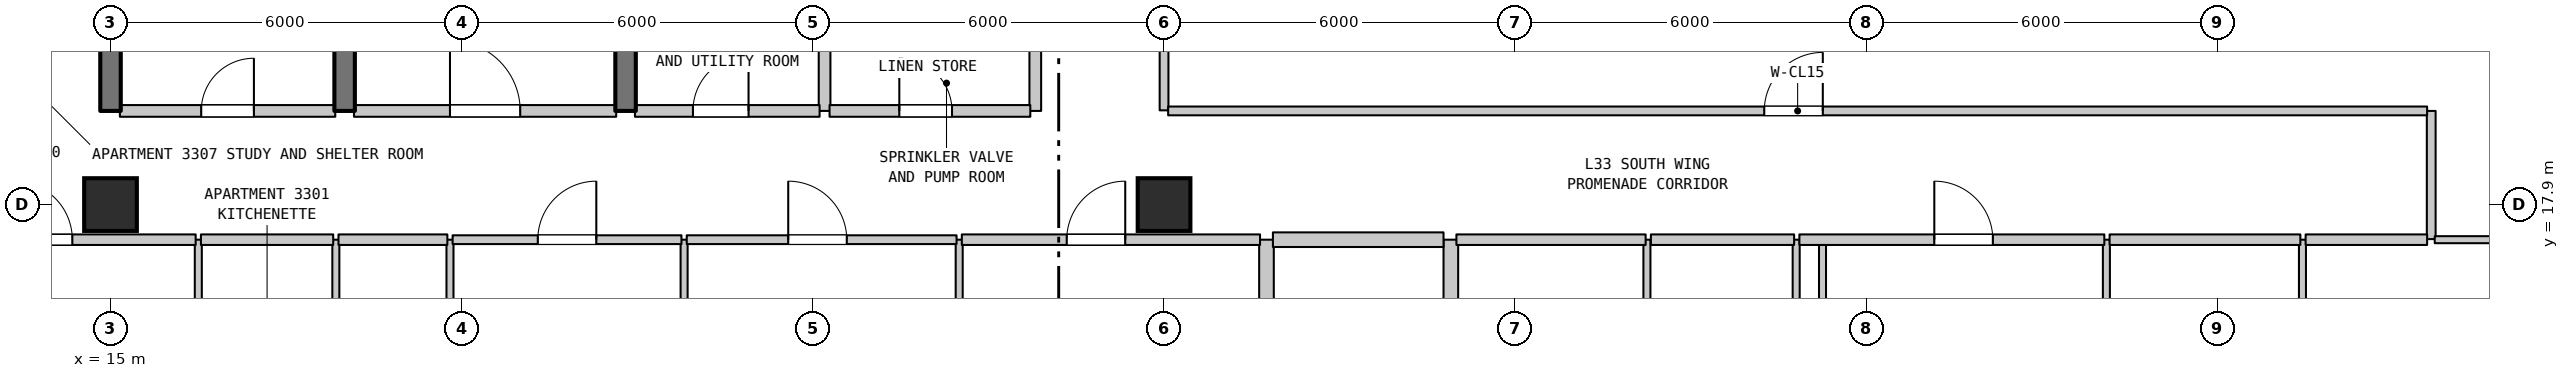
"""IFC4 building model, lengths in metres.
Left out: names, types, materials, properties, quantities, classifications, styles, units other than length and angle.
Written with IfcOpenShell. Run it as: python <this file> out.ifc"""

import sys

from ifc_helpers import new_model, si_unit, direction, frame, frame_2d, origin, origin_2d, place, context, subcontext, project, spatial, rectangle, extrude, element, fill, save


model = new_model("IFC4")
c1 = context("Model", 3, precision=1e-05, world=origin(), true_north=direction((0.0, 1.0)))
c2 = subcontext(c1, "Body", "Model", "MODEL_VIEW")
j1 = project(units=[si_unit("LENGTHUNIT", "METRE"), si_unit("PLANEANGLEUNIT", "RADIAN")], contexts=[c1])
p1 = place(None, origin())
s1 = spatial("IfcSite", under=j1, at=p1, CompositionType="ELEMENT")
p2 = place(p1, origin())
s2 = spatial("IfcBuilding", under=s1, at=p2, CompositionType="ELEMENT")
p3 = place(p2, frame((0.0, 0.0, 137.2)))
s3 = spatial("IfcBuildingStorey", under=s2, at=p3, CompositionType="ELEMENT", Elevation=137.2)
for number, where, z_axis, x_axis in (
    (1, (15.0, 17.9, 0.0), (0.0, 0.0, 1.0), (1.0, 0.0, 0.0)),
    (2, (33.0, 17.9, 0.0), (0.0, 0.0, 1.0), (1.0, 0.0, 0.0)),
):
    element("IfcColumn", number, at=place(p3, frame(where, z_axis=z_axis, x_axis=x_axis)), inside=s3, PredefinedType="COLUMN", context=c2, shape_type="SweptSolid", body=[
        extrude(rectangle(XDim=0.9, YDim=0.9, at=origin_2d()), origin(), (0.0, 0.0, 1.0), 3.7),
    ])
p4 = place(p3, frame((15.0, 19.5, 0.0), z_axis=(0.0, 0.0, 1.0), x_axis=(0.0, 1.0, 0.0)))
e3 = element("IfcWall", 3, at=p4, inside=s3, PredefinedType="SHEAR", context=c2, shape_type="SweptSolid", body=[
    extrude(rectangle(XDim=3.2, YDim=0.35, at=frame_2d((1.6, 0.0))), origin(), (0.0, 0.0, 1.0), 3.385),
])
p5 = place(p3, frame((16.5, 14.1, 0.0), z_axis=(0.0, 0.0, 1.0), x_axis=(0.0, 1.0, 0.0)))
e4 = element("IfcWall", 4, at=p5, inside=s3, PredefinedType="PARTITIONING", context=c2, shape_type="SweptSolid", body=[
    extrude(rectangle(XDim=3.2, YDim=0.12, at=frame_2d((1.6, 0.0))), origin(), (0.0, 0.0, 1.0), 3.385),
])
p6 = place(p5, frame((1.15, 0.0, 0.0)))
e5 = element("IfcOpeningElement", 5, at=p6, cuts=e4, PredefinedType="OPENING", context=c2, shape_type="SweptSolid", body=[
    extrude(rectangle(XDim=0.9, YDim=2.15, at=frame_2d((0.45, 1.075))), frame((0.0, 0.07, 0.0), z_axis=(0.0, -1.0, 0.0), x_axis=(1.0, 0.0, 0.0)), (0.0, 0.0, 1.0), 0.14),
])
p7 = place(p3, frame((18.85, 14.1, 0.0), z_axis=(0.0, 0.0, 1.0), x_axis=(0.0, 1.0, 0.0)))
e6 = element("IfcWall", 6, at=p7, inside=s3, PredefinedType="PARTITIONING", context=c2, shape_type="SweptSolid", body=[
    extrude(rectangle(XDim=3.2, YDim=0.12, at=frame_2d((1.6, 0.0))), origin(), (0.0, 0.0, 1.0), 3.385),
])
p8 = place(p3, frame((19.0, 19.5, 0.0), z_axis=(0.0, 0.0, 1.0), x_axis=(0.0, 1.0, 0.0)))
e7 = element("IfcWall", 7, at=p8, inside=s3, PredefinedType="SHEAR", context=c2, shape_type="SweptSolid", body=[
    extrude(rectangle(XDim=3.2, YDim=0.35, at=frame_2d((1.6, 0.0))), origin(), (0.0, 0.0, 1.0), 3.385),
])
p9 = place(p3, frame((20.8, 6.888, 0.0), z_axis=(0.0, 0.0, 1.0), x_axis=(0.0, 1.0, 0.0)))
e8 = element("IfcWall", 8, at=p9, inside=s3, PredefinedType="PARTITIONING", context=c2, shape_type="SweptSolid", body=[
    extrude(rectangle(XDim=10.412, YDim=0.12, at=frame_2d((5.206, 0.0))), origin(), (0.0, 0.0, 1.0), 3.385),
])
p10 = place(p3, frame((23.8, 19.5, 0.0), z_axis=(0.0, 0.0, 1.0), x_axis=(0.0, 1.0, 0.0)))
e9 = element("IfcWall", 9, at=p10, inside=s3, PredefinedType="SHEAR", context=c2, shape_type="SweptSolid", body=[
    extrude(rectangle(XDim=3.2, YDim=0.35, at=frame_2d((1.6, 0.0))), origin(), (0.0, 0.0, 1.0), 3.385),
])
p11 = place(p3, frame((24.8, 0.71, 0.0), z_axis=(0.0, 0.0, 1.0), x_axis=(0.0, 1.0, 0.0)))
e10 = element("IfcWall", 10, at=p11, inside=s3, PredefinedType="PARTITIONING", context=c2, shape_type="SweptSolid", body=[
    extrude(rectangle(XDim=16.59, YDim=0.12, at=frame_2d((8.295, 0.0))), origin(), (0.0, 0.0, 1.0), 3.385),
])
p12 = place(p3, frame((27.2, 19.5, 0.0), z_axis=(0.0, 0.0, 1.0), x_axis=(0.0, 1.0, 0.0)))
e11 = element("IfcWall", 11, at=p12, inside=s3, PredefinedType="STANDARD", context=c2, shape_type="SweptSolid", body=[
    extrude(rectangle(XDim=1.6, YDim=0.2, at=frame_2d((0.8, 0.0))), origin(), (0.0, 0.0, 1.0), 3.385),
])
p13 = place(p3, frame((29.5, 14.85, 0.0), z_axis=(0.0, 0.0, 1.0), x_axis=(0.0, 1.0, 0.0)))
e12 = element("IfcWall", 12, at=p13, inside=s3, PredefinedType="PARTITIONING", context=c2, shape_type="SweptSolid", body=[
    extrude(rectangle(XDim=2.45, YDim=0.12, at=frame_2d((1.225, 0.0))), origin(), (0.0, 0.0, 1.0), 3.385),
])
p14 = place(p3, frame((30.8, 19.5, 0.0), z_axis=(0.0, 0.0, 1.0), x_axis=(0.0, 1.0, 0.0)))
e13 = element("IfcWall", 13, at=p14, inside=s3, PredefinedType="STANDARD", context=c2, shape_type="SweptSolid", body=[
    extrude(rectangle(XDim=1.6, YDim=0.2, at=frame_2d((0.8, 0.0))), origin(), (0.0, 0.0, 1.0), 3.385),
])
p15 = place(p3, frame((33.0, 19.51, 0.0), z_axis=(0.0, 0.0, 1.0), x_axis=(0.0, 1.0, 0.0)))
e14 = element("IfcWall", 14, at=p15, inside=s3, PredefinedType="STANDARD", context=c2, shape_type="SweptSolid", body=[
    extrude(rectangle(XDim=3.66, YDim=0.15, at=frame_2d((1.83, 0.0))), origin(), (0.0, 0.0, 1.0), 2.935),
])
p16 = place(p15, frame((1.258, 0.0, 0.0)))
e15 = element("IfcOpeningElement", 15, at=p16, cuts=e14, PredefinedType="OPENING", context=c2, shape_type="SweptSolid", body=[
    extrude(rectangle(XDim=1.0, YDim=2.15, at=frame_2d((0.5, 1.075))), frame((0.0, 0.085, 0.0), z_axis=(0.0, -1.0, 0.0), x_axis=(1.0, 0.0, 0.0)), (0.0, 0.0, 1.0), 0.17),
])
for number, where, z_axis, x_axis in (
    (16, (34.75, 11.15, 0.0), (0.0, 0.0, 1.0), (0.0, 1.0, 0.0)),
    (17, (37.9, 11.15, 0.0), (0.0, 0.0, 1.0), (0.0, 1.0, 0.0)),
):
    element("IfcWall", number, at=place(p3, frame(where, z_axis=z_axis, x_axis=x_axis)), inside=s3, PredefinedType="STANDARD", context=c2, shape_type="SweptSolid", body=[
        extrude(rectangle(XDim=6.15, YDim=0.25, at=frame_2d((3.075, 0.0))), origin(), (0.0, 0.0, 1.0), 3.385),
    ])
for number, where, z_axis, x_axis in (
    (18, (41.25, 11.15, 0.0), (0.0, 0.0, 1.0), (0.0, 1.0, 0.0)),
    (19, (43.8, 11.15, 0.0), (0.0, 0.0, 1.0), (0.0, 1.0, 0.0)),
):
    element("IfcWall", number, at=place(p3, frame(where, z_axis=z_axis, x_axis=x_axis)), inside=s3, PredefinedType="PARTITIONING", context=c2, shape_type="SweptSolid", body=[
        extrude(rectangle(XDim=6.15, YDim=0.12, at=frame_2d((3.075, 0.0))), origin(), (0.0, 0.0, 1.0), 3.385),
    ])
p17 = place(p3, frame((44.25, 14.85, 0.0), z_axis=(0.0, 0.0, 1.0), x_axis=(0.0, 1.0, 0.0)))
e20 = element("IfcWall", 20, at=p17, inside=s3, PredefinedType="PARTITIONING", context=c2, shape_type="SweptSolid", body=[
    extrude(rectangle(XDim=2.45, YDim=0.12, at=frame_2d((1.225, 0.0))), origin(), (0.0, 0.0, 1.0), 3.385),
])
for number, where, z_axis, x_axis in (
    (21, (49.1, 11.15, 0.0), (0.0, 0.0, 1.0), (0.0, 1.0, 0.0)),
    (22, (52.45, 11.15, 0.0), (0.0, 0.0, 1.0), (0.0, 1.0, 0.0)),
):
    element("IfcWall", number, at=place(p3, frame(where, z_axis=z_axis, x_axis=x_axis)), inside=s3, PredefinedType="PARTITIONING", context=c2, shape_type="SweptSolid", body=[
        extrude(rectangle(XDim=6.15, YDim=0.12, at=frame_2d((3.075, 0.0))), origin(), (0.0, 0.0, 1.0), 3.385),
    ])
p18 = place(p3, frame((54.65, 17.31, 0.0), z_axis=(0.0, 0.0, 1.0), x_axis=(0.0, 1.0, 0.0)))
e23 = element("IfcWall", 23, at=p18, inside=s3, PredefinedType="STANDARD", context=c2, shape_type="SweptSolid", body=[
    extrude(rectangle(XDim=2.19, YDim=0.15, at=frame_2d((1.095, 0.0))), origin(), (0.0, 0.0, 1.0), 3.385),
])
p19 = place(p3, frame((12.875, 17.3, 0.0), z_axis=(0.0, 0.0, 1.0), x_axis=(1.0, 0.0, 0.0)))
e24 = element("IfcWall", 24, at=p19, inside=s3, PredefinedType="STANDARD", context=c2, shape_type="SweptSolid", body=[
    extrude(rectangle(XDim=3.58, YDim=0.18, at=frame_2d((1.79, 0.0))), origin(), (0.0, 0.0, 1.0), 3.385),
])
p20 = place(p19, frame((0.473, 0.0, 0.0)))
e25 = element("IfcOpeningElement", 25, at=p20, cuts=e24, PredefinedType="OPENING", context=c2, shape_type="SweptSolid", body=[
    extrude(rectangle(XDim=1.0, YDim=2.15, at=frame_2d((0.5, 1.075))), frame((0.0, 0.1, 0.0), z_axis=(0.0, -1.0, 0.0), x_axis=(1.0, 0.0, 0.0)), (0.0, 0.0, 1.0), 0.2),
])
p21 = place(p3, frame((16.545, 17.3, 0.0), z_axis=(0.0, 0.0, 1.0), x_axis=(1.0, 0.0, 0.0)))
e26 = element("IfcWall", 26, at=p21, inside=s3, PredefinedType="STANDARD", context=c2, shape_type="SweptSolid", body=[
    extrude(rectangle(XDim=2.26, YDim=0.18, at=frame_2d((1.13, 0.0))), origin(), (0.0, 0.0, 1.0), 3.385),
])
p22 = place(p3, frame((18.895, 17.3, 0.0), z_axis=(0.0, 0.0, 1.0), x_axis=(1.0, 0.0, 0.0)))
e27 = element("IfcWall", 27, at=p22, inside=s3, PredefinedType="STANDARD", context=c2, shape_type="SweptSolid", body=[
    extrude(rectangle(XDim=1.86, YDim=0.18, at=frame_2d((0.93, 0.0))), origin(), (0.0, 0.0, 1.0), 3.385),
])
p23 = place(p3, frame((20.845, 17.3, 0.0), z_axis=(0.0, 0.0, 1.0), x_axis=(1.0, 0.0, 0.0)))
e28 = element("IfcWall", 28, at=p23, inside=s3, PredefinedType="STANDARD", context=c2, shape_type="SweptSolid", body=[
    extrude(rectangle(XDim=3.91, YDim=0.15, at=frame_2d((1.955, 0.0))), origin(), (0.0, 0.0, 1.0), 3.385),
])
p24 = place(p23, frame((1.455, 0.0, 0.0)))
e29 = element("IfcOpeningElement", 29, at=p24, cuts=e28, PredefinedType="OPENING", context=c2, shape_type="SweptSolid", body=[
    extrude(rectangle(XDim=1.0, YDim=2.15, at=frame_2d((0.5, 1.075))), frame((0.0, 0.085, 0.0), z_axis=(0.0, -1.0, 0.0), x_axis=(1.0, 0.0, 0.0)), (0.0, 0.0, 1.0), 0.17),
])
p25 = place(p3, frame((24.845, 17.3, 0.0), z_axis=(0.0, 0.0, 1.0), x_axis=(1.0, 0.0, 0.0)))
e30 = element("IfcWall", 30, at=p25, inside=s3, PredefinedType="STANDARD", context=c2, shape_type="SweptSolid", body=[
    extrude(rectangle(XDim=4.61, YDim=0.15, at=frame_2d((2.305, 0.0))), origin(), (0.0, 0.0, 1.0), 3.385),
])
p26 = place(p25, frame((1.734, 0.0, 0.0)))
e31 = element("IfcOpeningElement", 31, at=p26, cuts=e30, PredefinedType="OPENING", context=c2, shape_type="SweptSolid", body=[
    extrude(rectangle(XDim=1.0, YDim=2.15, at=frame_2d((0.5, 1.075))), frame((0.0, 0.085, 0.0), z_axis=(0.0, -1.0, 0.0), x_axis=(1.0, 0.0, 0.0)), (0.0, 0.0, 1.0), 0.17),
])
p27 = place(p3, frame((29.545, 17.3, 0.0), z_axis=(0.0, 0.0, 1.0), x_axis=(1.0, 0.0, 0.0)))
e32 = element("IfcWall", 32, at=p27, inside=s3, PredefinedType="STANDARD", context=c2, shape_type="SweptSolid", body=[
    extrude(rectangle(XDim=5.095, YDim=0.18, at=frame_2d((2.547, 0.0))), origin(), (0.0, 0.0, 1.0), 3.385),
])
p28 = place(p27, frame((1.792, 0.0, 0.0)))
e33 = element("IfcOpeningElement", 33, at=p28, cuts=e32, PredefinedType="OPENING", context=c2, shape_type="SweptSolid", body=[
    extrude(rectangle(XDim=1.0, YDim=2.15, at=frame_2d((0.5, 1.075))), frame((0.0, 0.1, 0.0), z_axis=(0.0, -1.0, 0.0), x_axis=(1.0, 0.0, 0.0)), (0.0, 0.0, 1.0), 0.2),
])
p29 = place(p3, frame((34.86, 17.3, 0.0), z_axis=(0.0, 0.0, 1.0), x_axis=(1.0, 0.0, 0.0)))
e34 = element("IfcWall", 34, at=p29, inside=s3, PredefinedType="STANDARD", context=c2, shape_type="SweptSolid", body=[
    extrude(rectangle(XDim=2.915, YDim=0.25, at=frame_2d((1.458, 0.0))), origin(), (0.0, 0.0, 1.0), 3.385),
])
p30 = place(p3, frame((37.995, 17.3, 0.0), z_axis=(0.0, 0.0, 1.0), x_axis=(1.0, 0.0, 0.0)))
e35 = element("IfcWall", 35, at=p30, inside=s3, PredefinedType="STANDARD", context=c2, shape_type="SweptSolid", body=[
    extrude(rectangle(XDim=3.233, YDim=0.18, at=frame_2d((1.616, 0.0))), origin(), (0.0, 0.0, 1.0), 3.385),
])
p31 = place(p3, frame((41.318, 17.3, 0.0), z_axis=(0.0, 0.0, 1.0), x_axis=(1.0, 0.0, 0.0)))
e36 = element("IfcWall", 36, at=p31, inside=s3, PredefinedType="STANDARD", context=c2, shape_type="SweptSolid", body=[
    extrude(rectangle(XDim=2.447, YDim=0.18, at=frame_2d((1.223, 0.0))), origin(), (0.0, 0.0, 1.0), 3.385),
])
p32 = place(p3, frame((43.855, 17.3, 0.0), z_axis=(0.0, 0.0, 1.0), x_axis=(1.0, 0.0, 0.0)))
e37 = element("IfcWall", 37, at=p32, inside=s3, PredefinedType="STANDARD", context=c2, shape_type="SweptSolid", body=[
    extrude(rectangle(XDim=5.21, YDim=0.18, at=frame_2d((2.605, 0.0))), origin(), (0.0, 0.0, 1.0), 3.385),
])
p33 = place(p32, frame((2.305, 0.0, 0.0)))
e38 = element("IfcOpeningElement", 38, at=p33, cuts=e37, PredefinedType="OPENING", context=c2, shape_type="SweptSolid", body=[
    extrude(rectangle(XDim=1.0, YDim=2.15, at=frame_2d((0.5, 1.075))), frame((0.0, 0.1, 0.0), z_axis=(0.0, -1.0, 0.0), x_axis=(1.0, 0.0, 0.0)), (0.0, 0.0, 1.0), 0.2),
])
p34 = place(p3, frame((49.155, 17.3, 0.0), z_axis=(0.0, 0.0, 1.0), x_axis=(1.0, 0.0, 0.0)))
e39 = element("IfcWall", 39, at=p34, inside=s3, PredefinedType="STANDARD", context=c2, shape_type="SweptSolid", body=[
    extrude(rectangle(XDim=3.259, YDim=0.18, at=frame_2d((1.629, 0.0))), origin(), (0.0, 0.0, 1.0), 3.385),
])
p35 = place(p3, frame((52.504, 17.3, 0.0), z_axis=(0.0, 0.0, 1.0), x_axis=(1.0, 0.0, 0.0)))
e40 = element("IfcWall", 40, at=p35, inside=s3, PredefinedType="STANDARD", context=c2, shape_type="SweptSolid", body=[
    extrude(rectangle(XDim=2.076, YDim=0.18, at=frame_2d((1.038, 0.0))), origin(), (0.0, 0.0, 1.0), 3.385),
])
p36 = place(p3, frame((54.71, 17.3, 0.0), z_axis=(0.0, 0.0, 1.0), x_axis=(1.0, 0.0, 0.0)))
e41 = element("IfcWall", 41, at=p36, inside=s3, PredefinedType="PARTITIONING", context=c2, shape_type="SweptSolid", body=[
    extrude(rectangle(XDim=1.635, YDim=0.12, at=frame_2d((0.817, 0.0))), origin(), (0.0, 0.0, 1.0), 3.385),
])
p37 = place(p3, frame((15.16, 19.5, 0.0), z_axis=(0.0, 0.0, 1.0), x_axis=(1.0, 0.0, 0.0)))
e42 = element("IfcWall", 42, at=p37, inside=s3, PredefinedType="STANDARD", context=c2, shape_type="SweptSolid", body=[
    extrude(rectangle(XDim=3.68, YDim=0.2, at=frame_2d((1.84, 0.0))), origin(), (0.0, 0.0, 1.0), 3.385),
])
p38 = place(p37, frame((1.39, 0.0, 0.0)))
e43 = element("IfcOpeningElement", 43, at=p38, cuts=e42, PredefinedType="OPENING", context=c2, shape_type="SweptSolid", body=[
    extrude(rectangle(XDim=0.9, YDim=2.15, at=frame_2d((0.45, 1.075))), frame((0.0, 0.11, 0.0), z_axis=(0.0, -1.0, 0.0), x_axis=(1.0, 0.0, 0.0)), (0.0, 0.0, 1.0), 0.22),
])
p39 = place(p3, frame((19.16, 19.5, 0.0), z_axis=(0.0, 0.0, 1.0), x_axis=(1.0, 0.0, 0.0)))
e44 = element("IfcWall", 44, at=p39, inside=s3, PredefinedType="STANDARD", context=c2, shape_type="SweptSolid", body=[
    extrude(rectangle(XDim=4.48, YDim=0.2, at=frame_2d((2.24, 0.0))), origin(), (0.0, 0.0, 1.0), 3.385),
])
p40 = place(p39, frame((1.64, 0.0, 0.0)))
e45 = element("IfcOpeningElement", 45, at=p40, cuts=e44, PredefinedType="OPENING", context=c2, shape_type="SweptSolid", body=[
    extrude(rectangle(XDim=1.2, YDim=2.2, at=frame_2d((0.6, 1.1))), frame((0.0, 0.11, 0.0), z_axis=(0.0, -1.0, 0.0), x_axis=(1.0, 0.0, 0.0)), (0.0, 0.0, 1.0), 0.22),
])
p41 = place(p3, frame((23.96, 19.5, 0.0), z_axis=(0.0, 0.0, 1.0), x_axis=(1.0, 0.0, 0.0)))
e46 = element("IfcWall", 46, at=p41, inside=s3, PredefinedType="STANDARD", context=c2, shape_type="SweptSolid", body=[
    extrude(rectangle(XDim=3.155, YDim=0.2, at=frame_2d((1.578, 0.0))), origin(), (0.0, 0.0, 1.0), 3.385),
])
p42 = place(p41, frame((0.991, 0.0, 0.0)))
e47 = element("IfcOpeningElement", 47, at=p42, cuts=e46, PredefinedType="OPENING", context=c2, shape_type="SweptSolid", body=[
    extrude(rectangle(XDim=0.95, YDim=2.15, at=frame_2d((0.475, 1.075))), frame((0.0, 0.11, 0.0), z_axis=(0.0, -1.0, 0.0), x_axis=(1.0, 0.0, 0.0)), (0.0, 0.0, 1.0), 0.22),
])
p43 = place(p3, frame((27.285, 19.5, 0.0), z_axis=(0.0, 0.0, 1.0), x_axis=(1.0, 0.0, 0.0)))
e48 = element("IfcWall", 48, at=p43, inside=s3, PredefinedType="STANDARD", context=c2, shape_type="SweptSolid", body=[
    extrude(rectangle(XDim=3.43, YDim=0.2, at=frame_2d((1.715, 0.0))), origin(), (0.0, 0.0, 1.0), 3.385),
])
p44 = place(p43, frame((1.192, 0.0, 0.0)))
e49 = element("IfcOpeningElement", 49, at=p44, cuts=e48, PredefinedType="OPENING", context=c2, shape_type="SweptSolid", body=[
    extrude(rectangle(XDim=0.9, YDim=2.15, at=frame_2d((0.45, 1.075))), frame((0.0, 0.11, 0.0), z_axis=(0.0, -1.0, 0.0), x_axis=(1.0, 0.0, 0.0)), (0.0, 0.0, 1.0), 0.22),
])
p45 = place(p3, frame((33.07, 19.5, 0.0), z_axis=(0.0, 0.0, 1.0), x_axis=(1.0, 0.0, 0.0)))
e50 = element("IfcWall", 50, at=p45, inside=s3, PredefinedType="STANDARD", context=c2, shape_type="SweptSolid", body=[
    extrude(rectangle(XDim=21.51, YDim=0.15, at=frame_2d((10.755, 0.0))), origin(), (0.0, 0.0, 1.0), 3.385),
])
p46 = place(p45, frame((10.185, 0.0, 0.0)))
e51 = element("IfcOpeningElement", 51, at=p46, cuts=e50, PredefinedType="OPENING", context=c2, shape_type="SweptSolid", body=[
    extrude(rectangle(XDim=1.0, YDim=2.15, at=frame_2d((0.5, 1.075))), frame((0.0, 0.085, 0.0), z_axis=(0.0, -1.0, 0.0), x_axis=(1.0, 0.0, 0.0)), (0.0, 0.0, 1.0), 0.17),
])
p47 = place(p20, origin())
e52 = element("IfcDoor", 52, at=p47, inside=s3, OperationType="SINGLE_SWING_LEFT", PredefinedType="DOOR", context=c2, shape_type="SweptSolid", body=[
    extrude(rectangle(XDim=1.0, YDim=2.15, at=frame_2d((0.5, 1.075))), frame((0.0, 0.025, 0.0), z_axis=(0.0, -1.0, 0.0), x_axis=(1.0, 0.0, 0.0)), (0.0, 0.0, 1.0), 0.05),
])
fill(e25, e52)
p48 = place(p24, origin())
e53 = element("IfcDoor", 53, at=p48, inside=s3, OperationType="SINGLE_SWING_RIGHT", PredefinedType="DOOR", context=c2, shape_type="SweptSolid", body=[
    extrude(rectangle(XDim=1.0, YDim=2.15, at=frame_2d((0.5, 1.075))), frame((0.0, 0.025, 0.0), z_axis=(0.0, -1.0, 0.0), x_axis=(1.0, 0.0, 0.0)), (0.0, 0.0, 1.0), 0.05),
])
fill(e29, e53)
p49 = place(p26, origin())
e54 = element("IfcDoor", 54, at=p49, inside=s3, OperationType="SINGLE_SWING_LEFT", PredefinedType="DOOR", context=c2, shape_type="SweptSolid", body=[
    extrude(rectangle(XDim=1.0, YDim=2.15, at=frame_2d((0.5, 1.075))), frame((0.0, 0.025, 0.0), z_axis=(0.0, -1.0, 0.0), x_axis=(1.0, 0.0, 0.0)), (0.0, 0.0, 1.0), 0.05),
])
fill(e31, e54)
p50 = place(p28, origin())
e55 = element("IfcDoor", 55, at=p50, inside=s3, OperationType="SINGLE_SWING_RIGHT", PredefinedType="DOOR", context=c2, shape_type="SweptSolid", body=[
    extrude(rectangle(XDim=1.0, YDim=2.15, at=frame_2d((0.5, 1.075))), frame((0.0, 0.025, 0.0), z_axis=(0.0, -1.0, 0.0), x_axis=(1.0, 0.0, 0.0)), (0.0, 0.0, 1.0), 0.05),
])
fill(e33, e55)
p51 = place(p33, origin())
e56 = element("IfcDoor", 56, at=p51, inside=s3, OperationType="SINGLE_SWING_LEFT", PredefinedType="DOOR", context=c2, shape_type="SweptSolid", body=[
    extrude(rectangle(XDim=1.0, YDim=2.15, at=frame_2d((0.5, 1.075))), frame((0.0, 0.025, 0.0), z_axis=(0.0, -1.0, 0.0), x_axis=(1.0, 0.0, 0.0)), (0.0, 0.0, 1.0), 0.05),
])
fill(e38, e56)
p52 = place(p38, origin())
e57 = element("IfcDoor", 57, at=p52, inside=s3, OperationType="SINGLE_SWING_RIGHT", PredefinedType="DOOR", context=c2, shape_type="SweptSolid", body=[
    extrude(rectangle(XDim=0.9, YDim=2.15, at=frame_2d((0.45, 1.075))), frame((0.0, 0.025, 0.0), z_axis=(0.0, -1.0, 0.0), x_axis=(1.0, 0.0, 0.0)), (0.0, 0.0, 1.0), 0.05),
])
fill(e43, e57)
p53 = place(p40, origin())
e58 = element("IfcDoor", 58, at=p53, inside=s3, OperationType="SINGLE_SWING_LEFT", PredefinedType="DOOR", context=c2, shape_type="SweptSolid", body=[
    extrude(rectangle(XDim=1.2, YDim=2.2, at=frame_2d((0.6, 1.1))), frame((0.0, 0.025, 0.0), z_axis=(0.0, -1.0, 0.0), x_axis=(1.0, 0.0, 0.0)), (0.0, 0.0, 1.0), 0.05),
])
fill(e45, e58)
p54 = place(p42, origin())
e59 = element("IfcDoor", 59, at=p54, inside=s3, OperationType="SINGLE_SWING_RIGHT", PredefinedType="DOOR", context=c2, shape_type="SweptSolid", body=[
    extrude(rectangle(XDim=0.95, YDim=2.15, at=frame_2d((0.475, 1.075))), frame((0.0, 0.025, 0.0), z_axis=(0.0, -1.0, 0.0), x_axis=(1.0, 0.0, 0.0)), (0.0, 0.0, 1.0), 0.05),
])
fill(e47, e59)
p55 = place(p44, origin())
e60 = element("IfcDoor", 60, at=p55, inside=s3, OperationType="SINGLE_SWING_LEFT", PredefinedType="DOOR", context=c2, shape_type="SweptSolid", body=[
    extrude(rectangle(XDim=0.9, YDim=2.15, at=frame_2d((0.45, 1.075))), frame((0.0, 0.025, 0.0), z_axis=(0.0, -1.0, 0.0), x_axis=(1.0, 0.0, 0.0)), (0.0, 0.0, 1.0), 0.05),
])
fill(e49, e60)
p56 = place(p46, origin())
e61 = element("IfcDoor", 61, at=p56, inside=s3, OperationType="SINGLE_SWING_RIGHT", PredefinedType="DOOR", context=c2, shape_type="SweptSolid", body=[
    extrude(rectangle(XDim=1.0, YDim=2.15, at=frame_2d((0.5, 1.075))), frame((0.0, 0.025, 0.0), z_axis=(0.0, -1.0, 0.0), x_axis=(1.0, 0.0, 0.0)), (0.0, 0.0, 1.0), 0.05),
])
fill(e51, e61)
save(model, sys.argv[1])
